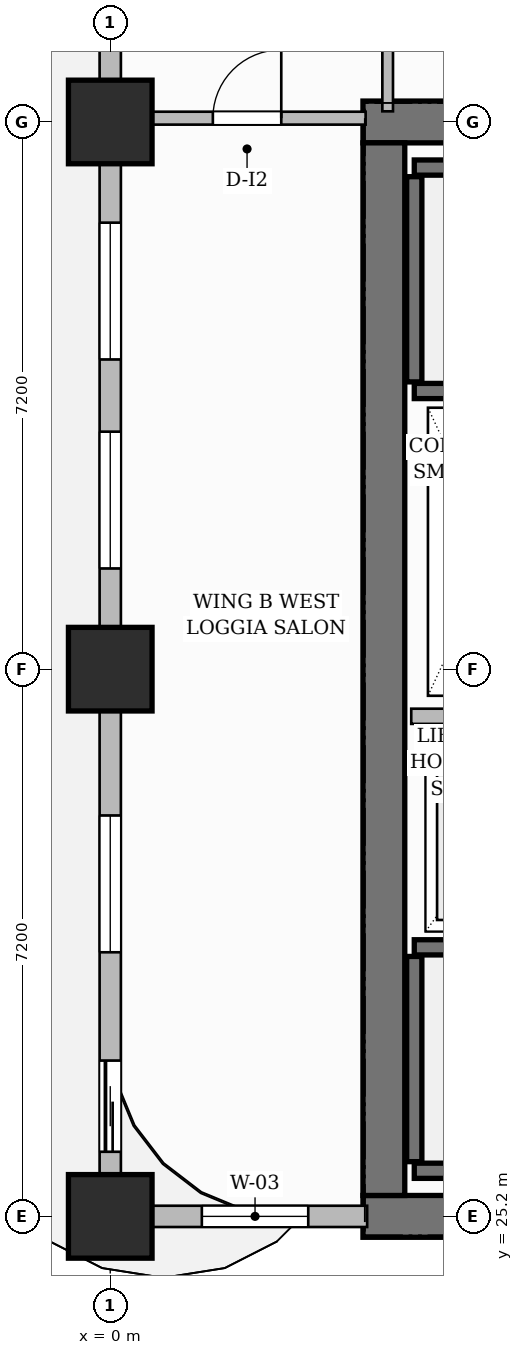
"""IFC4 building model, lengths in metres.
Left out: names, types, materials, properties, quantities, classifications, styles, units other than length and angle.
Written with IfcOpenShell. Run it as: python <this file> out.ifc"""

import sys

from ifc_helpers import new_model, si_unit, direction, frame, frame_2d, origin, origin_2d, place, context, subcontext, project, spatial, rectangle, extrude, source, transform, mapped, element, fill, save


model = new_model("IFC4")
c1 = context("Model", 3, precision=1e-05, world=origin(), true_north=direction((0.0, 1.0)))
c2 = subcontext(c1, "Body", "Model", "MODEL_VIEW")
j1 = project(units=[si_unit("LENGTHUNIT", "METRE"), si_unit("PLANEANGLEUNIT", "RADIAN")], contexts=[c1])
p1 = place(None, origin())
s1 = spatial("IfcSite", under=j1, at=p1, CompositionType="ELEMENT")
p2 = place(p1, origin())
s2 = spatial("IfcBuilding", under=s1, at=p2, CompositionType="ELEMENT")
p3 = place(p2, frame((0.0, 0.0, 87.9)))
s3 = spatial("IfcBuildingStorey", under=s2, at=p3, CompositionType="ELEMENT", Elevation=87.9)
for number, where, z_axis, x_axis in (
    (1, (3.325, 25.2, 0.0), (0.0, 0.0, 1.0), (1.0, 0.0, 0.0)),
    (2, (3.325, 39.6, 0.0), (0.0, 0.0, 1.0), (1.0, 0.0, 0.0)),
):
    element("IfcWall", number, at=place(p3, frame(where, z_axis=z_axis, x_axis=x_axis)), inside=s3, PredefinedType="SHEAR", context=c2, shape_type="SweptSolid", body=[
        extrude(rectangle(XDim=8.35, YDim=0.55, at=frame_2d((4.175, 0.0))), origin(), (0.0, 0.0, 1.0), 3.7),
    ])
p4 = place(p3, frame((3.6, 25.475, 0.0), z_axis=(0.0, 0.0, 1.0), x_axis=(0.0, 1.0, 0.0)))
e3 = element("IfcWall", 3, at=p4, inside=s3, PredefinedType="SHEAR", context=c2, shape_type="SweptSolid", body=[
    extrude(rectangle(XDim=13.85, YDim=0.55, at=frame_2d((6.925, 0.0))), origin(), (0.0, 0.0, 1.0), 3.7),
])
m1 = source(origin(), c2, "Body", "SweptSolid", [
    extrude(rectangle(XDim=1.1, YDim=1.1, at=origin_2d()), origin(), (0.0, 0.0, 1.0), 3.7),
])
for number, where, z_axis, x_axis in (
    (4, (0.0, 25.2, 0.0), (0.0, 0.0, 1.0), (1.0, 0.0, 0.0)),
    (5, (0.0, 32.4, 0.0), (0.0, 0.0, 1.0), (1.0, 0.0, 0.0)),
    (6, (0.0, 39.6, 0.0), (0.0, 0.0, 1.0), (1.0, 0.0, 0.0)),
):
    element("IfcColumn", number, at=place(p3, frame(where, z_axis=z_axis, x_axis=x_axis)), inside=s3, PredefinedType="COLUMN", context=c2, shape_type="MappedRepresentation", body=[
        mapped(m1, transform((0.0, 0.0, 0.0), scale=1.0)),
    ])
p5 = place(p3, frame((4.0, 25.8, 0.0), z_axis=(0.0, 0.0, 1.0), x_axis=(1.0, 0.0, 0.0)))
e7 = element("IfcWall", 7, at=p5, inside=s3, PredefinedType="SHEAR", context=c2, shape_type="SweptSolid", body=[
    extrude(rectangle(XDim=7.1, YDim=0.2, at=frame_2d((3.55, 0.0))), origin(), (0.0, 0.0, 1.0), 3.7),
])
p6 = place(p3, frame((4.0, 25.92, 0.0), z_axis=(0.0, 0.0, 1.0), x_axis=(0.0, 1.0, 0.0)))
e8 = element("IfcWall", 8, at=p6, inside=s3, PredefinedType="SHEAR", context=c2, shape_type="SweptSolid", body=[
    extrude(rectangle(XDim=2.7, YDim=0.2, at=frame_2d((1.35, 0.0))), origin(), (0.0, 0.0, 1.0), 3.7),
])
p7 = place(p3, frame((4.0, 28.74, 0.0), z_axis=(0.0, 0.0, 1.0), x_axis=(1.0, 0.0, 0.0)))
e9 = element("IfcWall", 9, at=p7, inside=s3, PredefinedType="SHEAR", context=c2, shape_type="SweptSolid", body=[
    extrude(rectangle(XDim=7.1, YDim=0.2, at=frame_2d((3.55, 0.0))), origin(), (0.0, 0.0, 1.0), 3.7),
])
p8 = place(p7, frame((5.815, 0.0, 0.0)))
e10 = element("IfcOpeningElement", 10, at=p8, cuts=e9, PredefinedType="OPENING", context=c2, shape_type="SweptSolid", body=[
    extrude(rectangle(XDim=1.05, YDim=2.2, at=frame_2d((0.525, 1.1))), frame((0.0, 0.11, 0.0), z_axis=(0.0, -1.0, 0.0), x_axis=(1.0, 0.0, 0.0)), (0.0, 0.0, 1.0), 0.22),
])
p9 = place(p3, frame((4.0, 39.0, 0.0), z_axis=(0.0, 0.0, 1.0), x_axis=(1.0, 0.0, 0.0)))
e11 = element("IfcWall", 11, at=p9, inside=s3, PredefinedType="SHEAR", context=c2, shape_type="SweptSolid", body=[
    extrude(rectangle(XDim=7.1, YDim=0.2, at=frame_2d((3.55, 0.0))), origin(), (0.0, 0.0, 1.0), 3.7),
])
p10 = place(p3, frame((4.0, 36.18, 0.0), z_axis=(0.0, 0.0, 1.0), x_axis=(0.0, 1.0, 0.0)))
e12 = element("IfcWall", 12, at=p10, inside=s3, PredefinedType="SHEAR", context=c2, shape_type="SweptSolid", body=[
    extrude(rectangle(XDim=2.7, YDim=0.2, at=frame_2d((1.35, 0.0))), origin(), (0.0, 0.0, 1.0), 3.7),
])
p11 = place(p3, frame((4.0, 36.06, 0.0), z_axis=(0.0, 0.0, 1.0), x_axis=(1.0, 0.0, 0.0)))
e13 = element("IfcWall", 13, at=p11, inside=s3, PredefinedType="SHEAR", context=c2, shape_type="SweptSolid", body=[
    extrude(rectangle(XDim=7.1, YDim=0.2, at=frame_2d((3.55, 0.0))), origin(), (0.0, 0.0, 1.0), 3.7),
])
p12 = place(p11, frame((5.815, 0.0, 0.0)))
e14 = element("IfcOpeningElement", 14, at=p12, cuts=e13, PredefinedType="OPENING", context=c2, shape_type="SweptSolid", body=[
    extrude(rectangle(XDim=1.05, YDim=2.2, at=frame_2d((0.525, 1.1))), frame((0.0, 0.11, 0.0), z_axis=(0.0, -1.0, 0.0), x_axis=(1.0, 0.0, 0.0)), (0.0, 0.0, 1.0), 0.22),
])
p13 = place(p3, frame((3.96, 31.78, 0.0), z_axis=(0.0, 0.0, 1.0), x_axis=(1.0, 0.0, 0.0)))
e15 = element("IfcWall", 15, at=p13, inside=s3, PredefinedType="PARTITIONING", context=c2, shape_type="SweptSolid", body=[
    extrude(rectangle(XDim=2.13, YDim=0.2, at=frame_2d((1.065, 0.0))), origin(), (0.0, 0.0, 1.0), 3.45),
])
p14 = place(p3, frame((0.24, 39.65, 0.0), z_axis=(0.0, 0.0, 1.0), x_axis=(1.0, 0.0, 0.0)))
e16 = element("IfcWall", 16, at=p14, inside=s3, PredefinedType="PARTITIONING", context=c2, shape_type="SweptSolid", body=[
    extrude(rectangle(XDim=3.12, YDim=0.17, at=frame_2d((1.56, 0.0))), origin(), (0.0, 0.0, 1.0), 3.45),
])
p15 = place(p14, frame((1.11, 0.0, 0.0)))
e17 = element("IfcOpeningElement", 17, at=p15, cuts=e16, PredefinedType="OPENING", context=c2, shape_type="SweptSolid", body=[
    extrude(rectangle(XDim=0.9, YDim=2.15, at=frame_2d((0.45, 1.075))), frame((0.0, 0.095, 0.0), z_axis=(0.0, -1.0, 0.0), x_axis=(1.0, 0.0, 0.0)), (0.0, 0.0, 1.0), 0.19),
])
p16 = place(p3, frame((3.65, 39.74, 0.0), z_axis=(0.0, 0.0, 1.0), x_axis=(0.0, 1.0, 0.0)))
e18 = element("IfcWall", 18, at=p16, inside=s3, PredefinedType="PARTITIONING", context=c2, shape_type="SweptSolid", body=[
    extrude(rectangle(XDim=1.745, YDim=0.14, at=frame_2d((0.873, 0.0))), origin(), (0.0, 0.0, 1.0), 3.45),
])
p17 = place(p3, frame((0.0, 25.2, 0.0), z_axis=(0.0, 0.0, 1.0), x_axis=(1.0, 0.0, 0.0)))
e19 = element("IfcWall", 19, at=p17, inside=s3, PredefinedType="SOLIDWALL", context=c2, shape_type="SweptSolid", body=[
    extrude(rectangle(XDim=3.38, YDim=0.28, at=frame_2d((1.69, 0.0))), origin(), (0.0, 0.0, 1.0), 3.45),
])
p18 = place(p17, frame((1.205, 0.0, 0.8)))
e20 = element("IfcOpeningElement", 20, at=p18, cuts=e19, PredefinedType="OPENING", context=c2, shape_type="SweptSolid", body=[
    extrude(rectangle(XDim=1.4, YDim=1.85, at=frame_2d((0.7, 0.925))), frame((0.0, 0.15, 0.0), z_axis=(0.0, -1.0, 0.0), x_axis=(1.0, 0.0, 0.0)), (0.0, 0.0, 1.0), 0.3),
])
p19 = place(p3, frame((0.0, 25.25, 0.0), z_axis=(0.0, 0.0, 1.0), x_axis=(0.0, 1.0, 0.0)))
e21 = element("IfcWall", 21, at=p19, inside=s3, PredefinedType="SOLIDWALL", context=c2, shape_type="SweptSolid", body=[
    extrude(rectangle(XDim=21.5, YDim=0.28, at=frame_2d((10.75, 0.0))), origin(), (0.0, 0.0, 1.0), 2.885),
])
p20 = place(p19, frame((18.607, 0.0, 0.0)))
e22 = element("IfcOpeningElement", 22, at=p20, cuts=e21, PredefinedType="OPENING", context=c2, shape_type="SweptSolid", body=[
    extrude(rectangle(XDim=1.2, YDim=2.2, at=frame_2d((0.6, 1.1))), frame((0.0, 0.15, 0.0), z_axis=(0.0, -1.0, 0.0), x_axis=(1.0, 0.0, 0.0)), (0.0, 0.0, 1.0), 0.3),
])
p21 = place(p19, frame((0.8, 0.0, 0.0)))
e23 = element("IfcOpeningElement", 23, at=p21, cuts=e21, PredefinedType="OPENING", context=c2, shape_type="SweptSolid", body=[
    extrude(rectangle(XDim=1.2, YDim=2.2, at=frame_2d((0.6, 1.1))), frame((0.0, 0.15, 0.0), z_axis=(0.0, -1.0, 0.0), x_axis=(1.0, 0.0, 0.0)), (0.0, 0.0, 1.0), 0.3),
])
p22 = place(p19, frame((3.425, 0.0, 0.8)))
e24 = element("IfcOpeningElement", 24, at=p22, cuts=e21, PredefinedType="OPENING", context=c2, shape_type="SweptSolid", body=[
    extrude(rectangle(XDim=1.8, YDim=1.85, at=frame_2d((0.9, 0.925))), frame((0.0, 0.15, 0.0), z_axis=(0.0, -1.0, 0.0), x_axis=(1.0, 0.0, 0.0)), (0.0, 0.0, 1.0), 0.3),
])
p23 = place(p19, frame((8.475, 0.0, 0.8)))
e25 = element("IfcOpeningElement", 25, at=p23, cuts=e21, PredefinedType="OPENING", context=c2, shape_type="SweptSolid", body=[
    extrude(rectangle(XDim=1.8, YDim=1.85, at=frame_2d((0.9, 0.925))), frame((0.0, 0.15, 0.0), z_axis=(0.0, -1.0, 0.0), x_axis=(1.0, 0.0, 0.0)), (0.0, 0.0, 1.0), 0.3),
])
p24 = place(p19, frame((11.225, 0.0, 0.8)))
e26 = element("IfcOpeningElement", 26, at=p24, cuts=e21, PredefinedType="OPENING", context=c2, shape_type="SweptSolid", body=[
    extrude(rectangle(XDim=1.8, YDim=1.85, at=frame_2d((0.9, 0.925))), frame((0.0, 0.15, 0.0), z_axis=(0.0, -1.0, 0.0), x_axis=(1.0, 0.0, 0.0)), (0.0, 0.0, 1.0), 0.3),
])
p25 = place(p19, frame((15.621, 0.0, 0.8)))
e27 = element("IfcOpeningElement", 27, at=p25, cuts=e21, PredefinedType="OPENING", context=c2, shape_type="SweptSolid", body=[
    extrude(rectangle(XDim=1.8, YDim=1.85, at=frame_2d((0.9, 0.925))), frame((0.0, 0.15, 0.0), z_axis=(0.0, -1.0, 0.0), x_axis=(1.0, 0.0, 0.0)), (0.0, 0.0, 1.0), 0.3),
])
m2 = source(origin(), c2, "Body", "SweptSolid", [
    extrude(rectangle(XDim=0.9, YDim=2.15, at=frame_2d((0.45, 1.075))), frame((0.0, 0.025, 0.0), z_axis=(0.0, -1.0, 0.0), x_axis=(1.0, 0.0, 0.0)), (0.0, 0.0, 1.0), 0.05),
])
p26 = place(p15, origin())
e28 = element("IfcDoor", 28, at=p26, inside=s3, OperationType="SINGLE_SWING_RIGHT", PredefinedType="DOOR", context=c2, shape_type="MappedRepresentation", body=[
    mapped(m2, transform((0.0, 0.0, 0.0), scale=1.0)),
])
fill(e17, e28)
m3 = source(origin(), c2, "Body", "SweptSolid", [
    extrude(rectangle(XDim=1.2, YDim=2.2, at=frame_2d((0.6, 1.1))), frame((0.0, 0.025, 0.0), z_axis=(0.0, -1.0, 0.0), x_axis=(1.0, 0.0, 0.0)), (0.0, 0.0, 1.0), 0.05),
])
p27 = place(p21, origin())
e29 = element("IfcDoor", 29, at=p27, inside=s3, OperationType="SLIDING_TO_LEFT", PredefinedType="DOOR", context=c2, shape_type="MappedRepresentation", body=[
    mapped(m3, transform((0.0, 0.0, 0.0), scale=1.0)),
])
fill(e23, e29)
m4 = source(origin(), c2, "Body", "SweptSolid", [
    extrude(rectangle(XDim=1.4, YDim=1.85, at=frame_2d((0.7, 0.925))), frame((0.0, 0.03, 0.0), z_axis=(0.0, -1.0, 0.0), x_axis=(1.0, 0.0, 0.0)), (0.0, 0.0, 1.0), 0.06),
])
p28 = place(p18, origin())
e30 = element("IfcWindow", 30, at=p28, inside=s3, PartitioningType="SINGLE_PANEL", PredefinedType="WINDOW", context=c2, shape_type="MappedRepresentation", body=[
    mapped(m4, transform((0.0, 0.0, 0.0), scale=1.0)),
])
fill(e20, e30)
m5 = source(origin(), c2, "Body", "SweptSolid", [
    extrude(rectangle(XDim=1.8, YDim=1.85, at=frame_2d((0.9, 0.925))), frame((0.0, 0.03, 0.0), z_axis=(0.0, -1.0, 0.0), x_axis=(1.0, 0.0, 0.0)), (0.0, 0.0, 1.0), 0.06),
])
p29 = place(p22, origin())
e31 = element("IfcWindow", 31, at=p29, inside=s3, PartitioningType="DOUBLE_PANEL_VERTICAL", PredefinedType="WINDOW", context=c2, shape_type="MappedRepresentation", body=[
    mapped(m5, transform((0.0, 0.0, 0.0), scale=1.0)),
])
fill(e24, e31)
p30 = place(p23, origin())
e32 = element("IfcWindow", 32, at=p30, inside=s3, PartitioningType="DOUBLE_PANEL_VERTICAL", PredefinedType="WINDOW", context=c2, shape_type="MappedRepresentation", body=[
    mapped(m5, transform((0.0, 0.0, 0.0), scale=1.0)),
])
fill(e25, e32)
p31 = place(p24, origin())
e33 = element("IfcWindow", 33, at=p31, inside=s3, PartitioningType="DOUBLE_PANEL_VERTICAL", PredefinedType="WINDOW", context=c2, shape_type="MappedRepresentation", body=[
    mapped(m5, transform((0.0, 0.0, 0.0), scale=1.0)),
])
fill(e26, e33)
save(model, sys.argv[1])
